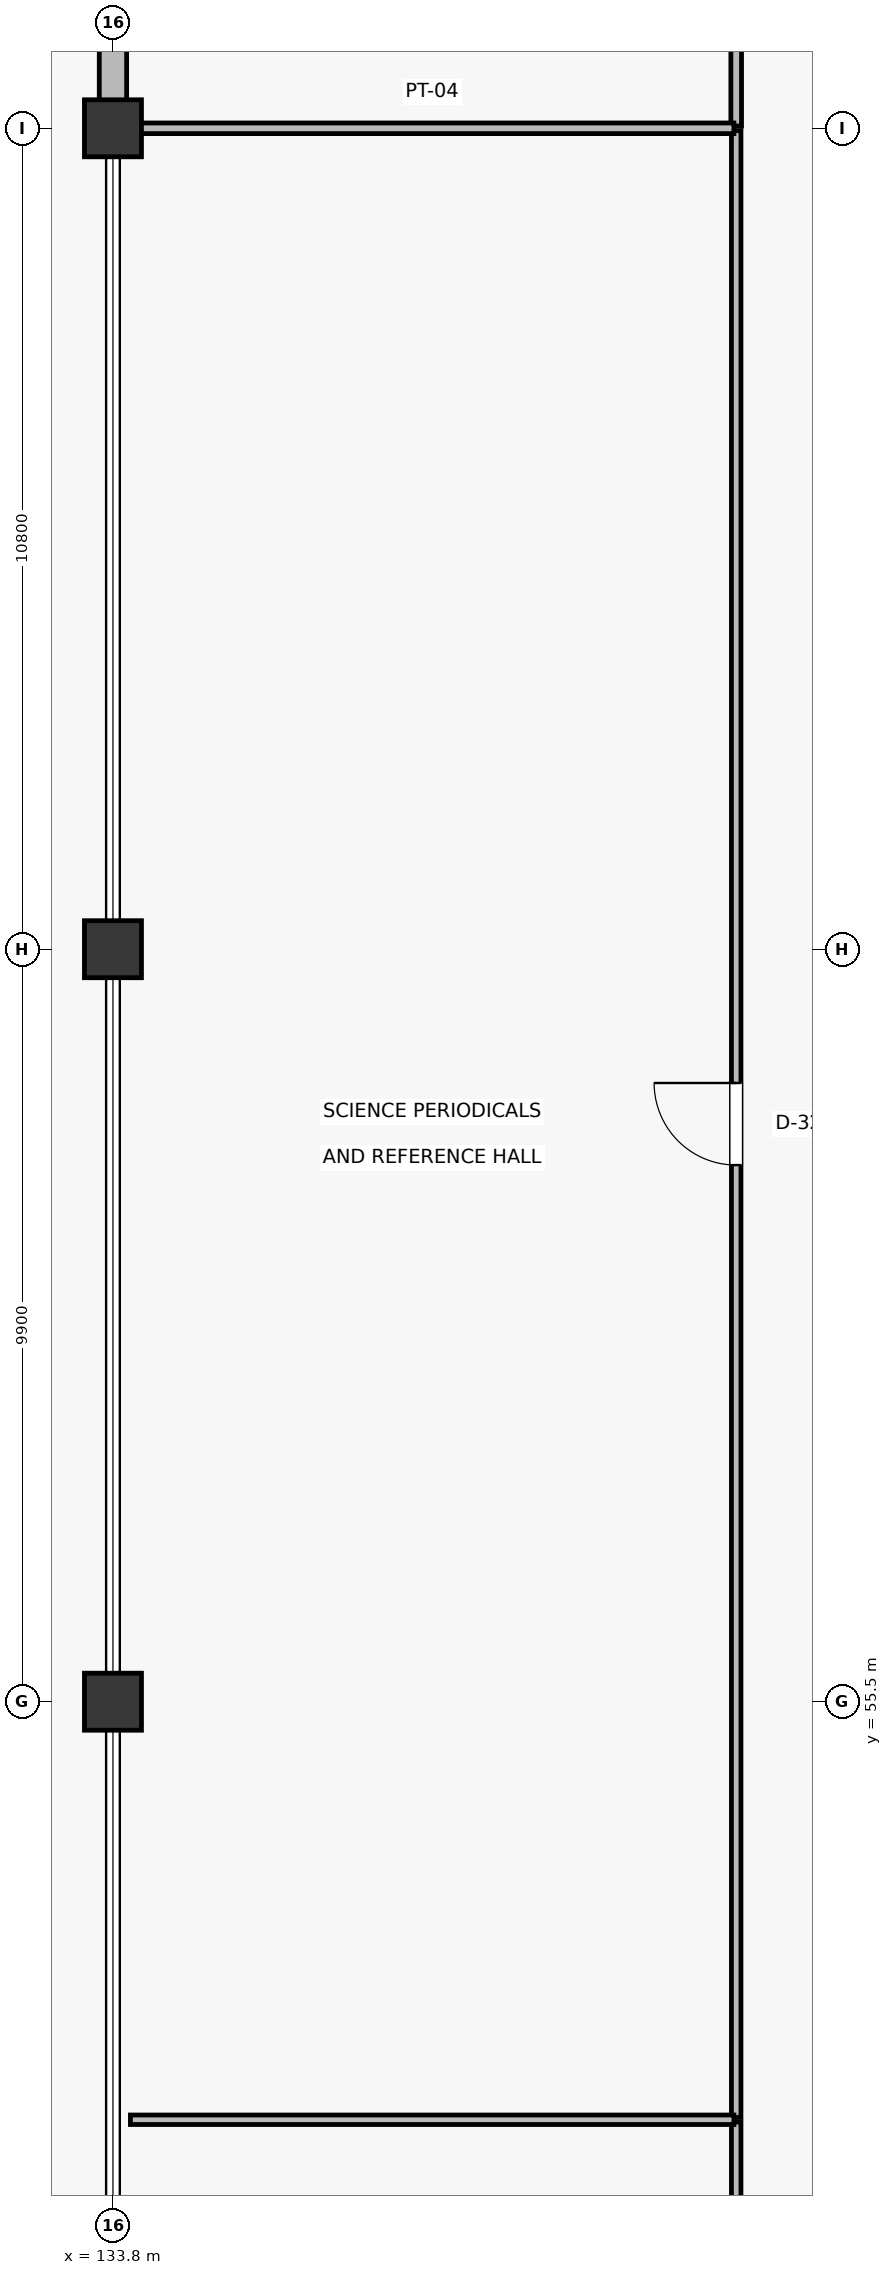
"""IFC4 building model, lengths in metres.
Left out: names, types, materials, properties, quantities, classifications, styles, units other than length and angle.
Written with IfcOpenShell. Run it as: python <this file> out.ifc"""

import sys

from ifc_helpers import new_model, si_unit, direction, frame, frame_2d, origin, origin_2d, place, context, subcontext, project, spatial, rectangle, extrude, element, fill, save


model = new_model("IFC4")
c1 = context("Model", 3, precision=1e-05, world=origin(), true_north=direction((0.0, 1.0)))
c2 = subcontext(c1, "Body", "Model", "MODEL_VIEW")
j1 = project(units=[si_unit("LENGTHUNIT", "METRE"), si_unit("PLANEANGLEUNIT", "RADIAN")], contexts=[c1])
p1 = place(None, origin())
s1 = spatial("IfcSite", under=j1, at=p1, CompositionType="ELEMENT")
p2 = place(p1, origin())
s2 = spatial("IfcBuilding", under=s1, at=p2, CompositionType="ELEMENT")
p3 = place(p2, origin())
s3 = spatial("IfcBuildingStorey", under=s2, at=p3, CompositionType="ELEMENT", Elevation=0.0)
for number, where, z_axis, x_axis in (
    (1, (133.8, 55.5, 0.0), (0.0, 0.0, 1.0), (1.0, 0.0, 0.0)),
    (2, (133.8, 65.4, 0.0), (0.0, 0.0, 1.0), (1.0, 0.0, 0.0)),
    (3, (133.8, 76.2, 0.0), (0.0, 0.0, 1.0), (1.0, 0.0, 0.0)),
):
    element("IfcColumn", number, at=place(p3, frame(where, z_axis=z_axis, x_axis=x_axis)), inside=s3, PredefinedType="COLUMN", context=c2, shape_type="SweptSolid", body=[
        extrude(rectangle(XDim=0.75, YDim=0.75, at=origin_2d()), origin(), (0.0, 0.0, 1.0), 5.4),
    ])
p4 = place(p3, frame((133.8, 76.565, 0.0), z_axis=(0.0, 0.0, 1.0), x_axis=(0.0, 1.0, 0.0)))
e4 = element("IfcWall", 4, at=p4, inside=s3, PredefinedType="SOLIDWALL", context=c2, shape_type="SweptSolid", body=[
    extrude(rectangle(XDim=6.58, YDim=0.36, at=frame_2d((3.29, 0.0))), origin(), (0.0, 0.0, 1.0), 4.495),
])
p5 = place(p4, frame((2.715, 0.0, 0.85)))
e5 = element("IfcOpeningElement", 5, at=p5, cuts=e4, PredefinedType="OPENING", context=c2, shape_type="SweptSolid", body=[
    extrude(rectangle(XDim=1.15, YDim=1.15, at=frame_2d((0.575, 0.575))), frame((0.0, 0.19, 0.0), z_axis=(0.0, -1.0, 0.0), x_axis=(1.0, 0.0, 0.0)), (0.0, 0.0, 1.0), 0.38),
])
p6 = place(p3, frame((142.0, 36.13, 0.0), z_axis=(0.0, 0.0, 1.0), x_axis=(0.0, 1.0, 0.0)))
e6 = element("IfcWall", 6, at=p6, inside=s3, PredefinedType="PARTITIONING", context=c2, shape_type="SweptSolid", body=[
    extrude(rectangle(XDim=13.84, YDim=0.125, at=frame_2d((6.92, 0.0))), origin(), (0.0, 0.0, 1.0), 4.315),
])
p7 = place(p6, frame((6.42, 0.0, 0.0)))
e7 = element("IfcOpeningElement", 7, at=p7, cuts=e6, PredefinedType="OPENING", context=c2, shape_type="SweptSolid", body=[
    extrude(rectangle(XDim=1.0, YDim=2.15, at=frame_2d((0.5, 1.075))), frame((0.0, 0.073, 0.0), z_axis=(0.0, -1.0, 0.0), x_axis=(1.0, 0.0, 0.0)), (0.0, 0.0, 1.0), 0.145),
])
p8 = place(p3, frame((142.0, 50.03, 0.0), z_axis=(0.0, 0.0, 1.0), x_axis=(0.0, 1.0, 0.0)))
e8 = element("IfcWall", 8, at=p8, inside=s3, PredefinedType="PARTITIONING", context=c2, shape_type="SweptSolid", body=[
    extrude(rectangle(XDim=26.14, YDim=0.125, at=frame_2d((13.07, 0.0))), origin(), (0.0, 0.0, 1.0), 4.155),
])
p9 = place(p8, frame((12.53, 0.0, 0.0)))
e9 = element("IfcOpeningElement", 9, at=p9, cuts=e8, PredefinedType="OPENING", context=c2, shape_type="SweptSolid", body=[
    extrude(rectangle(XDim=1.08, YDim=2.15, at=frame_2d((0.54, 1.075))), frame((0.0, 0.073, 0.0), z_axis=(0.0, -1.0, 0.0), x_axis=(1.0, 0.0, 0.0)), (0.0, 0.0, 1.0), 0.145),
])
p10 = place(p3, frame((142.0, 76.23, 0.0), z_axis=(0.0, 0.0, 1.0), x_axis=(0.0, 1.0, 0.0)))
e10 = element("IfcWall", 10, at=p10, inside=s3, PredefinedType="PARTITIONING", context=c2, shape_type="SweptSolid", body=[
    extrude(rectangle(XDim=40.54, YDim=0.14, at=frame_2d((20.27, 0.0))), origin(), (0.0, 0.0, 1.0), 4.155),
])
p11 = place(p10, frame((19.695, 0.0, 0.0)))
e11 = element("IfcOpeningElement", 11, at=p11, cuts=e10, PredefinedType="OPENING", context=c2, shape_type="SweptSolid", body=[
    extrude(rectangle(XDim=1.15, YDim=2.15, at=frame_2d((0.575, 1.075))), frame((0.0, 0.08, 0.0), z_axis=(0.0, -1.0, 0.0), x_axis=(1.0, 0.0, 0.0)), (0.0, 0.0, 1.0), 0.16),
])
p12 = place(p3, frame((134.03, 50.0, 0.0), z_axis=(0.0, 0.0, 1.0), x_axis=(1.0, 0.0, 0.0)))
e12 = element("IfcWall", 12, at=p12, inside=s3, PredefinedType="PARTITIONING", context=c2, shape_type="SweptSolid", body=[
    extrude(rectangle(XDim=7.94, YDim=0.125, at=frame_2d((3.97, 0.0))), origin(), (0.0, 0.0, 1.0), 4.265),
])
p13 = place(p3, frame((134.03, 76.2, 0.0), z_axis=(0.0, 0.0, 1.0), x_axis=(1.0, 0.0, 0.0)))
e13 = element("IfcWall", 13, at=p13, inside=s3, PredefinedType="PARTITIONING", context=c2, shape_type="SweptSolid", body=[
    extrude(rectangle(XDim=7.94, YDim=0.14, at=frame_2d((3.97, 0.0))), origin(), (0.0, 0.0, 1.0), 4.155),
])
p14 = place(p9, origin())
e14 = element("IfcDoor", 14, at=p14, inside=s3, OperationType="SINGLE_SWING_RIGHT", PredefinedType="DOOR", context=c2, shape_type="SweptSolid", body=[
    extrude(rectangle(XDim=1.08, YDim=2.15, at=frame_2d((0.54, 1.075))), frame((0.0, 0.025, 0.0), z_axis=(0.0, -1.0, 0.0), x_axis=(1.0, 0.0, 0.0)), (0.0, 0.0, 1.0), 0.05),
])
fill(e9, e14)
save(model, sys.argv[1])
